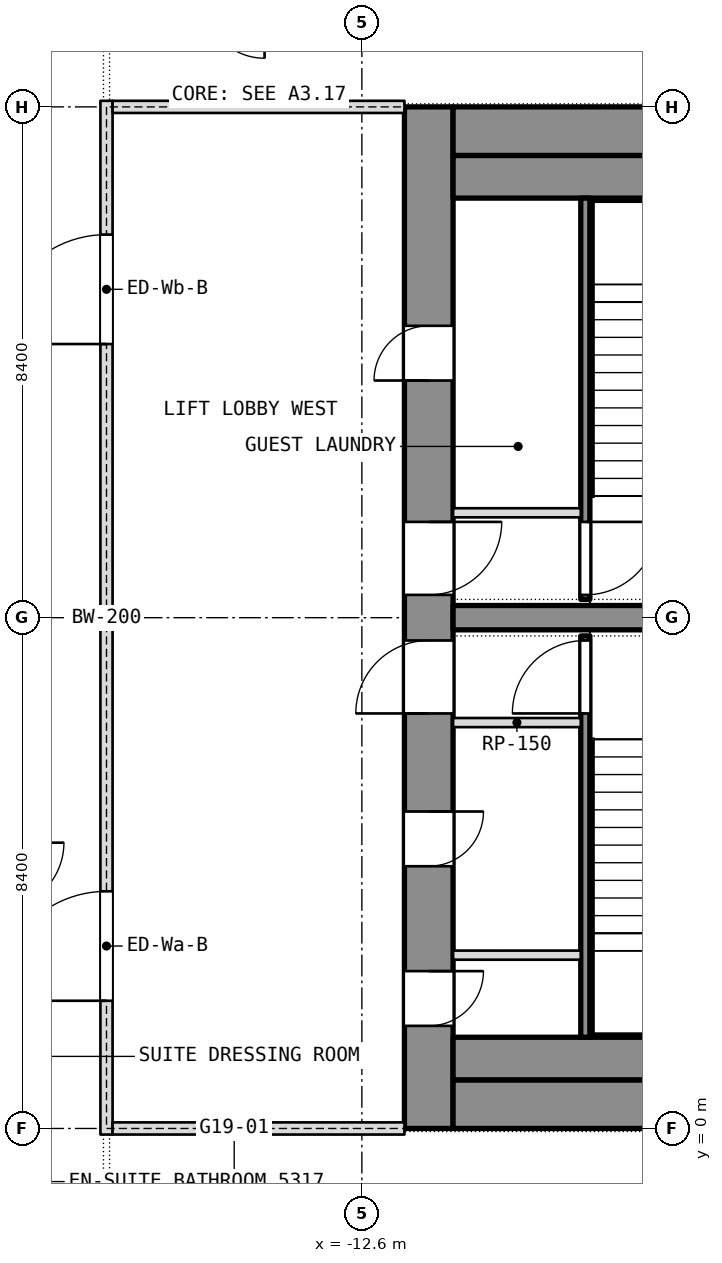
"""IFC4 building model, lengths in metres.
Left out: names, types, materials, properties, quantities, classifications, styles, units other than length and angle.
Written with IfcOpenShell. Run it as: python <this file> out.ifc"""

import sys

from ifc_helpers import new_model, si_unit, direction, frame, frame_2d, origin, place, context, subcontext, project, spatial, rectangle, extrude, element, fill, save


model = new_model("IFC4")
c1 = context("Model", 3, precision=1e-05, world=origin(), true_north=direction((0.0, 1.0)))
c2 = subcontext(c1, "Body", "Model", "MODEL_VIEW")
j1 = project(units=[si_unit("LENGTHUNIT", "METRE"), si_unit("PLANEANGLEUNIT", "RADIAN")], contexts=[c1])
p1 = place(None, origin())
s1 = spatial("IfcSite", under=j1, at=p1, CompositionType="ELEMENT")
p2 = place(p1, origin())
s2 = spatial("IfcBuilding", under=s1, at=p2, CompositionType="ELEMENT")
p3 = place(p2, frame((0.0, 0.0, 227.3)))
s3 = spatial("IfcBuildingStorey", under=s2, at=p3, CompositionType="ELEMENT", Elevation=227.3)
p4 = place(p3, frame((-11.5, 0.0, 0.0), z_axis=(0.0, 0.0, 1.0), x_axis=(0.0, 1.0, 0.0)))
e1 = element("IfcWall", 1, at=p4, inside=s3, PredefinedType="SHEAR", context=c2, shape_type="SweptSolid", body=[
    extrude(rectangle(XDim=16.8, YDim=0.8, at=frame_2d((8.4, 0.0))), origin(), (0.0, 0.0, 1.0), 3.6),
])
p5 = place(p4, frame((1.688, 0.0, 0.0)))
e2 = element("IfcOpeningElement", 2, at=p5, cuts=e1, PredefinedType="OPENING", context=c2, shape_type="SweptSolid", body=[
    extrude(rectangle(XDim=0.9, YDim=2.1, at=frame_2d((0.45, 1.05))), frame((0.0, 0.4, 0.0), z_axis=(0.0, -1.0, 0.0), x_axis=(1.0, 0.0, 0.0)), (0.0, 0.0, 1.0), 0.8),
])
p6 = place(p4, frame((4.312, 0.0, 0.0)))
e3 = element("IfcOpeningElement", 3, at=p6, cuts=e1, PredefinedType="OPENING", context=c2, shape_type="SweptSolid", body=[
    extrude(rectangle(XDim=0.9, YDim=2.1, at=frame_2d((0.45, 1.05))), frame((0.0, 0.4, 0.0), z_axis=(0.0, -1.0, 0.0), x_axis=(1.0, 0.0, 0.0)), (0.0, 0.0, 1.0), 0.8),
])
p7 = place(p4, frame((6.825, 0.0, 0.0)))
e4 = element("IfcOpeningElement", 4, at=p7, cuts=e1, PredefinedType="OPENING", context=c2, shape_type="SweptSolid", body=[
    extrude(rectangle(XDim=1.2, YDim=2.1, at=frame_2d((0.6, 1.05))), frame((0.0, 0.4, 0.0), z_axis=(0.0, -1.0, 0.0), x_axis=(1.0, 0.0, 0.0)), (0.0, 0.0, 1.0), 0.8),
])
p8 = place(p4, frame((12.3, 0.0, 0.0)))
e5 = element("IfcOpeningElement", 5, at=p8, cuts=e1, PredefinedType="OPENING", context=c2, shape_type="SweptSolid", body=[
    extrude(rectangle(XDim=0.9, YDim=2.1, at=frame_2d((0.45, 1.05))), frame((0.0, 0.4, 0.0), z_axis=(0.0, -1.0, 0.0), x_axis=(1.0, 0.0, 0.0)), (0.0, 0.0, 1.0), 0.8),
])
p9 = place(p4, frame((8.775, 0.0, 0.0)))
e6 = element("IfcOpeningElement", 6, at=p9, cuts=e1, PredefinedType="OPENING", context=c2, shape_type="SweptSolid", body=[
    extrude(rectangle(XDim=1.2, YDim=2.1, at=frame_2d((0.6, 1.05))), frame((0.0, 0.4, 0.0), z_axis=(0.0, -1.0, 0.0), x_axis=(1.0, 0.0, 0.0)), (0.0, 0.0, 1.0), 0.8),
])
for number, where, z_axis, x_axis in (
    (7, (-11.1, 0.4, 0.0), (0.0, 0.0, 1.0), (1.0, 0.0, 0.0)),
    (8, (-11.1, 16.4, 0.0), (0.0, 0.0, 1.0), (1.0, 0.0, 0.0)),
):
    element("IfcWall", number, at=place(p3, frame(where, z_axis=z_axis, x_axis=x_axis)), inside=s3, PredefinedType="SHEAR", context=c2, shape_type="SweptSolid", body=[
        extrude(rectangle(XDim=22.2, YDim=0.8, at=frame_2d((11.1, 0.0))), origin(), (0.0, 0.0, 1.0), 3.6),
    ])
p10 = place(p3, frame((-11.1, 8.4, 0.0), z_axis=(0.0, 0.0, 1.0), x_axis=(1.0, 0.0, 0.0)))
e9 = element("IfcWall", 9, at=p10, inside=s3, PredefinedType="SHEAR", context=c2, shape_type="SweptSolid", body=[
    extrude(rectangle(XDim=6.7, YDim=0.4, at=frame_2d((3.35, 0.0))), origin(), (0.0, 0.0, 1.0), 3.6),
])
for number, where, z_axis, x_axis in (
    (10, (-11.1, 1.15, 0.0), (0.0, 0.0, 1.0), (1.0, 0.0, 0.0)),
    (11, (-11.1, 15.65, 0.0), (0.0, 0.0, 1.0), (1.0, 0.0, 0.0)),
):
    element("IfcWall", number, at=place(p3, frame(where, z_axis=z_axis, x_axis=x_axis)), inside=s3, PredefinedType="PARTITIONING", context=c2, shape_type="SweptSolid", body=[
        extrude(rectangle(XDim=22.2, YDim=0.7, at=frame_2d((11.1, 0.0))), origin(), (0.0, 0.0, 1.0), 3.34),
    ])
p11 = place(p3, frame((-8.925, 1.5, 0.0), z_axis=(0.0, 0.0, 1.0), x_axis=(0.0, 1.0, 0.0)))
e12 = element("IfcWall", 12, at=p11, inside=s3, PredefinedType="SHEAR", context=c2, shape_type="SweptSolid", body=[
    extrude(rectangle(XDim=6.6, YDim=0.15, at=frame_2d((3.3, 0.0))), origin(), (0.0, 0.0, 1.0), 3.34),
])
p12 = place(p11, frame((5.325, 0.0, 0.0)))
e13 = element("IfcOpeningElement", 13, at=p12, cuts=e12, PredefinedType="OPENING", context=c2, shape_type="SweptSolid", body=[
    extrude(rectangle(XDim=1.2, YDim=2.1, at=frame_2d((0.6, 1.05))), frame((0.0, 0.075, 0.0), z_axis=(0.0, -1.0, 0.0), x_axis=(1.0, 0.0, 0.0)), (0.0, 0.0, 1.0), 0.15),
])
for number, where, z_axis, x_axis in (
    (14, (-11.1, 6.675, 0.0), (0.0, 0.0, 1.0), (1.0, 0.0, 0.0)),
    (15, (-11.1, 2.85, 0.0), (0.0, 0.0, 1.0), (1.0, 0.0, 0.0)),
):
    element("IfcWall", number, at=place(p3, frame(where, z_axis=z_axis, x_axis=x_axis)), inside=s3, PredefinedType="PARTITIONING", context=c2, shape_type="SweptSolid", body=[
        extrude(rectangle(XDim=2.1, YDim=0.15, at=frame_2d((1.05, 0.0))), origin(), (0.0, 0.0, 1.0), 3.34),
    ])
p13 = place(p3, frame((-8.925, 8.7, 0.0), z_axis=(0.0, 0.0, 1.0), x_axis=(0.0, 1.0, 0.0)))
e16 = element("IfcWall", 16, at=p13, inside=s3, PredefinedType="SHEAR", context=c2, shape_type="SweptSolid", body=[
    extrude(rectangle(XDim=6.6, YDim=0.15, at=frame_2d((3.3, 0.0))), origin(), (0.0, 0.0, 1.0), 3.34),
])
p14 = place(p13, frame((0.075, 0.0, 0.0)))
e17 = element("IfcOpeningElement", 17, at=p14, cuts=e16, PredefinedType="OPENING", context=c2, shape_type="SweptSolid", body=[
    extrude(rectangle(XDim=1.2, YDim=2.1, at=frame_2d((0.6, 1.05))), frame((0.0, 0.075, 0.0), z_axis=(0.0, -1.0, 0.0), x_axis=(1.0, 0.0, 0.0)), (0.0, 0.0, 1.0), 0.15),
])
p15 = place(p3, frame((-11.1, 10.125, 0.0), z_axis=(0.0, 0.0, 1.0), x_axis=(1.0, 0.0, 0.0)))
e18 = element("IfcWall", 18, at=p15, inside=s3, PredefinedType="PARTITIONING", context=c2, shape_type="SweptSolid", body=[
    extrude(rectangle(XDim=2.1, YDim=0.15, at=frame_2d((1.05, 0.0))), origin(), (0.0, 0.0, 1.0), 3.34),
])
p16 = place(p3, frame((-16.8, -0.1, 0.0), z_axis=(0.0, 0.0, 1.0), x_axis=(0.0, 1.0, 0.0)))
e19 = element("IfcWall", 19, at=p16, inside=s3, PredefinedType="PARTITIONING", context=c2, shape_type="SweptSolid", body=[
    extrude(rectangle(XDim=17.0, YDim=0.2, at=frame_2d((8.5, 0.0))), origin(), (0.0, 0.0, 1.0), 3.34),
])
p17 = place(p16, frame((2.2, 0.0, 0.0)))
e20 = element("IfcOpeningElement", 20, at=p17, cuts=e19, PredefinedType="OPENING", context=c2, shape_type="SweptSolid", body=[
    extrude(rectangle(XDim=1.8, YDim=2.1, at=frame_2d((0.9, 1.05))), frame((0.0, 0.1, 0.0), z_axis=(0.0, -1.0, 0.0), x_axis=(1.0, 0.0, 0.0)), (0.0, 0.0, 1.0), 0.2),
])
p18 = place(p16, frame((13.0, 0.0, 0.0)))
e21 = element("IfcOpeningElement", 21, at=p18, cuts=e19, PredefinedType="OPENING", context=c2, shape_type="SweptSolid", body=[
    extrude(rectangle(XDim=1.8, YDim=2.1, at=frame_2d((0.9, 1.05))), frame((0.0, 0.1, 0.0), z_axis=(0.0, -1.0, 0.0), x_axis=(1.0, 0.0, 0.0)), (0.0, 0.0, 1.0), 0.2),
])
for number, where, z_axis, x_axis in (
    (22, (-16.7, 0.0, 0.0), (0.0, 0.0, 1.0), (1.0, 0.0, 0.0)),
    (23, (-16.7, 16.8, 0.0), (0.0, 0.0, 1.0), (1.0, 0.0, 0.0)),
):
    element("IfcWall", number, at=place(p3, frame(where, z_axis=z_axis, x_axis=x_axis)), inside=s3, PredefinedType="PARTITIONING", context=c2, shape_type="SweptSolid", body=[
        extrude(rectangle(XDim=4.8, YDim=0.2, at=frame_2d((2.4, 0.0))), origin(), (0.0, 0.0, 1.0), 2.94),
    ])
p19 = place(p5, origin())
e24 = element("IfcDoor", 24, at=p19, inside=s3, OperationType="SINGLE_SWING_LEFT", PredefinedType="DOOR", context=c2, shape_type="SweptSolid", body=[
    extrude(rectangle(XDim=0.9, YDim=2.1, at=frame_2d((0.45, 1.05))), frame((0.0, 0.025, 0.0), z_axis=(0.0, -1.0, 0.0), x_axis=(1.0, 0.0, 0.0)), (0.0, 0.0, 1.0), 0.05),
])
fill(e2, e24)
p20 = place(p6, origin())
e25 = element("IfcDoor", 25, at=p20, inside=s3, OperationType="SINGLE_SWING_LEFT", PredefinedType="DOOR", context=c2, shape_type="SweptSolid", body=[
    extrude(rectangle(XDim=0.9, YDim=2.1, at=frame_2d((0.45, 1.05))), frame((0.0, 0.025, 0.0), z_axis=(0.0, -1.0, 0.0), x_axis=(1.0, 0.0, 0.0)), (0.0, 0.0, 1.0), 0.05),
])
fill(e3, e25)
p21 = place(p7, origin())
e26 = element("IfcDoor", 26, at=p21, inside=s3, OperationType="SINGLE_SWING_LEFT", PredefinedType="DOOR", context=c2, shape_type="SweptSolid", body=[
    extrude(rectangle(XDim=1.2, YDim=2.1, at=frame_2d((0.6, 1.05))), frame((0.0, 0.025, 0.0), z_axis=(0.0, -1.0, 0.0), x_axis=(1.0, 0.0, 0.0)), (0.0, 0.0, 1.0), 0.05),
])
fill(e4, e26)
p22 = place(p12, origin())
e27 = element("IfcDoor", 27, at=p22, inside=s3, OperationType="SINGLE_SWING_LEFT", PredefinedType="DOOR", context=c2, shape_type="SweptSolid", body=[
    extrude(rectangle(XDim=1.2, YDim=2.1, at=frame_2d((0.6, 1.05))), frame((0.0, 0.025, 0.0), z_axis=(0.0, -1.0, 0.0), x_axis=(1.0, 0.0, 0.0)), (0.0, 0.0, 1.0), 0.05),
])
fill(e13, e27)
p23 = place(p8, origin())
e28 = element("IfcDoor", 28, at=p23, inside=s3, OperationType="SINGLE_SWING_LEFT", PredefinedType="DOOR", context=c2, shape_type="SweptSolid", body=[
    extrude(rectangle(XDim=0.9, YDim=2.1, at=frame_2d((0.45, 1.05))), frame((0.0, 0.025, 0.0), z_axis=(0.0, -1.0, 0.0), x_axis=(1.0, 0.0, 0.0)), (0.0, 0.0, 1.0), 0.05),
])
fill(e5, e28)
p24 = place(p9, origin())
e29 = element("IfcDoor", 29, at=p24, inside=s3, OperationType="SINGLE_SWING_LEFT", PredefinedType="DOOR", context=c2, shape_type="SweptSolid", body=[
    extrude(rectangle(XDim=1.2, YDim=2.1, at=frame_2d((0.6, 1.05))), frame((0.0, 0.025, 0.0), z_axis=(0.0, -1.0, 0.0), x_axis=(1.0, 0.0, 0.0)), (0.0, 0.0, 1.0), 0.05),
])
fill(e6, e29)
p25 = place(p14, origin())
e30 = element("IfcDoor", 30, at=p25, inside=s3, OperationType="SINGLE_SWING_LEFT", PredefinedType="DOOR", context=c2, shape_type="SweptSolid", body=[
    extrude(rectangle(XDim=1.2, YDim=2.1, at=frame_2d((0.6, 1.05))), frame((0.0, 0.025, 0.0), z_axis=(0.0, -1.0, 0.0), x_axis=(1.0, 0.0, 0.0)), (0.0, 0.0, 1.0), 0.05),
])
fill(e17, e30)
p26 = place(p17, origin())
e31 = element("IfcDoor", 31, at=p26, inside=s3, OperationType="DOUBLE_DOOR_SINGLE_SWING", PredefinedType="DOOR", context=c2, shape_type="SweptSolid", body=[
    extrude(rectangle(XDim=1.8, YDim=2.1, at=frame_2d((0.9, 1.05))), frame((0.0, 0.025, 0.0), z_axis=(0.0, -1.0, 0.0), x_axis=(1.0, 0.0, 0.0)), (0.0, 0.0, 1.0), 0.05),
])
fill(e20, e31)
p27 = place(p18, origin())
e32 = element("IfcDoor", 32, at=p27, inside=s3, OperationType="DOUBLE_DOOR_SINGLE_SWING", PredefinedType="DOOR", context=c2, shape_type="SweptSolid", body=[
    extrude(rectangle(XDim=1.8, YDim=2.1, at=frame_2d((0.9, 1.05))), frame((0.0, 0.025, 0.0), z_axis=(0.0, -1.0, 0.0), x_axis=(1.0, 0.0, 0.0)), (0.0, 0.0, 1.0), 0.05),
])
fill(e21, e32)
save(model, sys.argv[1])
